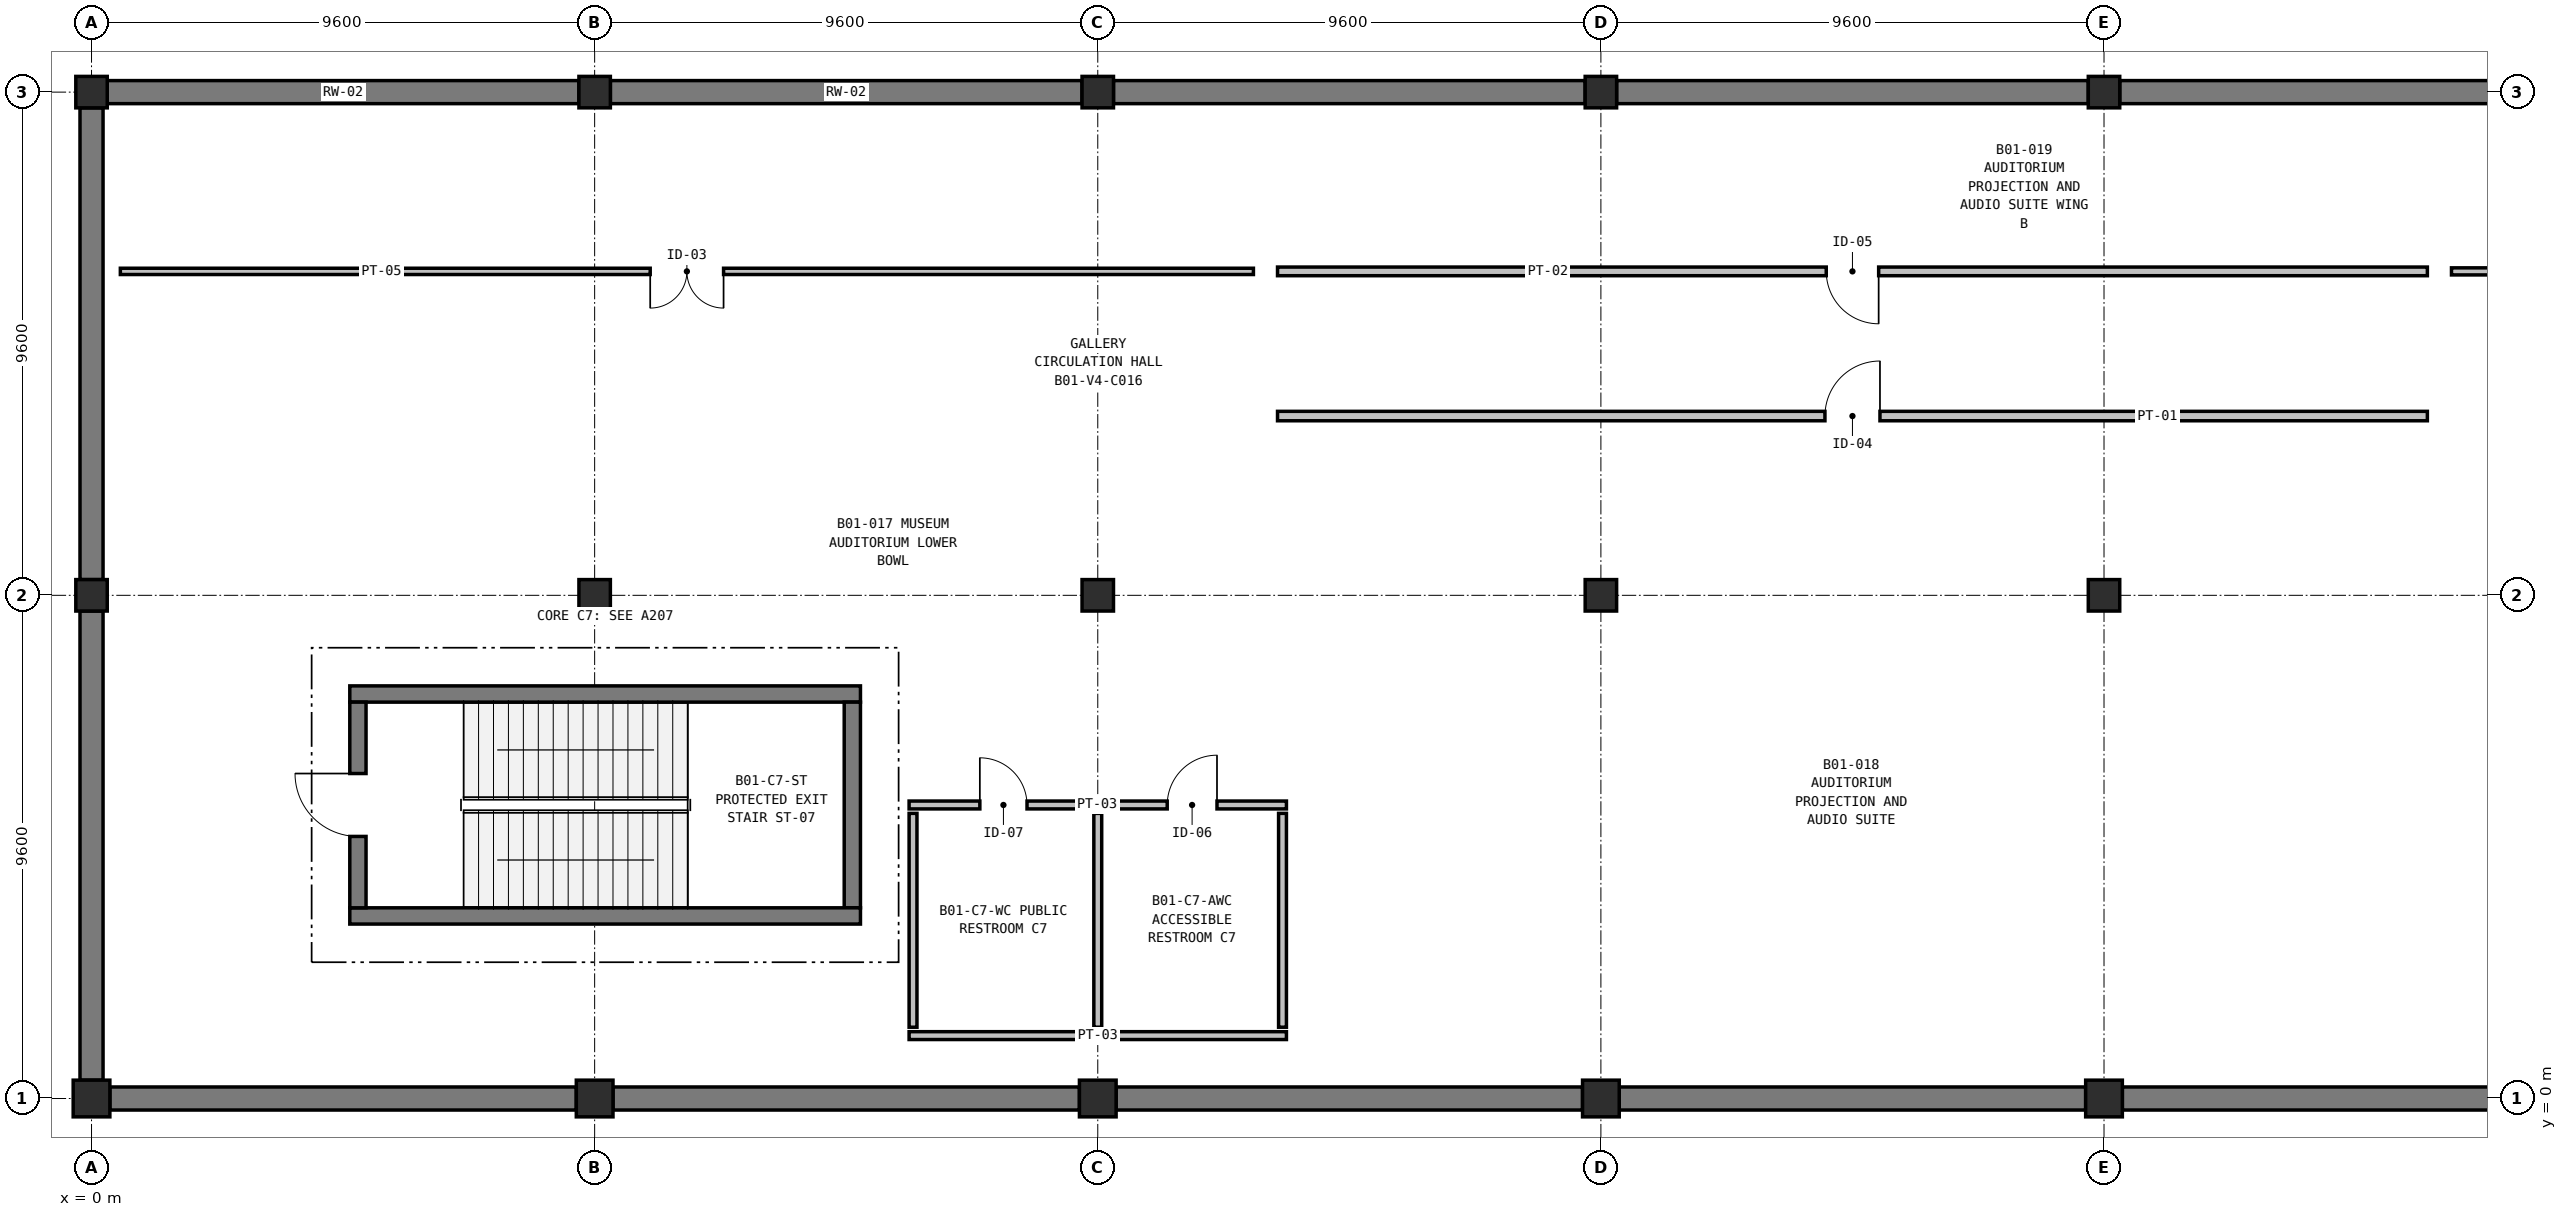
"""IFC4 building model, lengths in metres.
Left out: names, types, materials, properties, quantities, classifications, styles, units other than length and angle.
Written with IfcOpenShell. Run it as: python <this file> out.ifc"""

import sys

from ifc_helpers import new_model, si_unit, direction, frame, frame_2d, origin, origin_with_axes, origin_2d, place, context, subcontext, project, spatial, rectangle, extrude, element, fill, save


model = new_model("IFC4")
c1 = context("Model", 3, precision=1e-05, world=origin(), true_north=direction((0.0, 1.0)))
c2 = subcontext(c1, "Body", "Model", "MODEL_VIEW")
j1 = project(units=[si_unit("LENGTHUNIT", "METRE"), si_unit("PLANEANGLEUNIT", "RADIAN")], contexts=[c1])
p1 = place(None, origin())
s1 = spatial("IfcSite", under=j1, at=p1, CompositionType="ELEMENT")
p2 = place(p1, origin())
s2 = spatial("IfcBuilding", under=s1, at=p2, CompositionType="ELEMENT")
p3 = place(p2, frame((0.0, 0.0, -5.4)))
s3 = spatial("IfcBuildingStorey", under=s2, at=p3, CompositionType="ELEMENT", Elevation=-5.4)
p4 = place(p3, origin_with_axes())
e1 = element("IfcColumn", 1, at=p4, inside=s3, PredefinedType="COLUMN", context=c2, shape_type="SweptSolid", body=[
    extrude(rectangle(XDim=0.7, YDim=0.7, at=origin_2d()), origin(), (0.0, 0.0, 1.0), 5.4),
])
for number, where, z_axis, x_axis in (
    (2, (0.0, 9.6, 0.0), (0.0, 0.0, 1.0), (1.0, 0.0, 0.0)),
    (3, (0.0, 19.2, 0.0), (0.0, 0.0, 1.0), (1.0, 0.0, 0.0)),
):
    element("IfcColumn", number, at=place(p3, frame(where, z_axis=z_axis, x_axis=x_axis)), inside=s3, PredefinedType="COLUMN", context=c2, shape_type="SweptSolid", body=[
        extrude(rectangle(XDim=0.6, YDim=0.6, at=origin_2d()), origin(), (0.0, 0.0, 1.0), 5.4),
    ])
p5 = place(p3, frame((9.6, 0.0, 0.0), z_axis=(0.0, 0.0, 1.0), x_axis=(1.0, 0.0, 0.0)))
e4 = element("IfcColumn", 4, at=p5, inside=s3, PredefinedType="COLUMN", context=c2, shape_type="SweptSolid", body=[
    extrude(rectangle(XDim=0.7, YDim=0.7, at=origin_2d()), origin(), (0.0, 0.0, 1.0), 5.4),
])
for number, where, z_axis, x_axis in (
    (5, (9.6, 9.6, 0.0), (0.0, 0.0, 1.0), (1.0, 0.0, 0.0)),
    (6, (9.6, 19.2, 0.0), (0.0, 0.0, 1.0), (1.0, 0.0, 0.0)),
):
    element("IfcColumn", number, at=place(p3, frame(where, z_axis=z_axis, x_axis=x_axis)), inside=s3, PredefinedType="COLUMN", context=c2, shape_type="SweptSolid", body=[
        extrude(rectangle(XDim=0.6, YDim=0.6, at=origin_2d()), origin(), (0.0, 0.0, 1.0), 5.4),
    ])
p6 = place(p3, frame((19.2, 0.0, 0.0), z_axis=(0.0, 0.0, 1.0), x_axis=(1.0, 0.0, 0.0)))
e7 = element("IfcColumn", 7, at=p6, inside=s3, PredefinedType="COLUMN", context=c2, shape_type="SweptSolid", body=[
    extrude(rectangle(XDim=0.7, YDim=0.7, at=origin_2d()), origin(), (0.0, 0.0, 1.0), 5.4),
])
for number, where, z_axis, x_axis in (
    (8, (19.2, 9.6, 0.0), (0.0, 0.0, 1.0), (1.0, 0.0, 0.0)),
    (9, (19.2, 19.2, 0.0), (0.0, 0.0, 1.0), (1.0, 0.0, 0.0)),
):
    element("IfcColumn", number, at=place(p3, frame(where, z_axis=z_axis, x_axis=x_axis)), inside=s3, PredefinedType="COLUMN", context=c2, shape_type="SweptSolid", body=[
        extrude(rectangle(XDim=0.6, YDim=0.6, at=origin_2d()), origin(), (0.0, 0.0, 1.0), 5.4),
    ])
p7 = place(p3, frame((28.8, 0.0, 0.0), z_axis=(0.0, 0.0, 1.0), x_axis=(1.0, 0.0, 0.0)))
e10 = element("IfcColumn", 10, at=p7, inside=s3, PredefinedType="COLUMN", context=c2, shape_type="SweptSolid", body=[
    extrude(rectangle(XDim=0.7, YDim=0.7, at=origin_2d()), origin(), (0.0, 0.0, 1.0), 5.4),
])
for number, where, z_axis, x_axis in (
    (11, (28.8, 9.6, 0.0), (0.0, 0.0, 1.0), (1.0, 0.0, 0.0)),
    (12, (28.8, 19.2, 0.0), (0.0, 0.0, 1.0), (1.0, 0.0, 0.0)),
):
    element("IfcColumn", number, at=place(p3, frame(where, z_axis=z_axis, x_axis=x_axis)), inside=s3, PredefinedType="COLUMN", context=c2, shape_type="SweptSolid", body=[
        extrude(rectangle(XDim=0.6, YDim=0.6, at=origin_2d()), origin(), (0.0, 0.0, 1.0), 5.4),
    ])
p8 = place(p3, frame((38.4, 0.0, 0.0), z_axis=(0.0, 0.0, 1.0), x_axis=(1.0, 0.0, 0.0)))
e13 = element("IfcColumn", 13, at=p8, inside=s3, PredefinedType="COLUMN", context=c2, shape_type="SweptSolid", body=[
    extrude(rectangle(XDim=0.7, YDim=0.7, at=origin_2d()), origin(), (0.0, 0.0, 1.0), 5.4),
])
for number, where, z_axis, x_axis in (
    (14, (38.4, 9.6, 0.0), (0.0, 0.0, 1.0), (1.0, 0.0, 0.0)),
    (15, (38.4, 19.2, 0.0), (0.0, 0.0, 1.0), (1.0, 0.0, 0.0)),
):
    element("IfcColumn", number, at=place(p3, frame(where, z_axis=z_axis, x_axis=x_axis)), inside=s3, PredefinedType="COLUMN", context=c2, shape_type="SweptSolid", body=[
        extrude(rectangle(XDim=0.6, YDim=0.6, at=origin_2d()), origin(), (0.0, 0.0, 1.0), 5.4),
    ])
for number, where, z_axis, x_axis in (
    (16, (0.3, 19.2, 0.0), (0.0, 0.0, 1.0), (1.0, 0.0, 0.0)),
    (17, (9.9, 19.2, 0.0), (0.0, 0.0, 1.0), (1.0, 0.0, 0.0)),
    (18, (19.5, 19.2, 0.0), (0.0, 0.0, 1.0), (1.0, 0.0, 0.0)),
    (19, (29.1, 19.2, 0.0), (0.0, 0.0, 1.0), (1.0, 0.0, 0.0)),
    (20, (38.7, 19.2, 0.0), (0.0, 0.0, 1.0), (1.0, 0.0, 0.0)),
):
    element("IfcWall", number, at=place(p3, frame(where, z_axis=z_axis, x_axis=x_axis)), inside=s3, PredefinedType="USERDEFINED", context=c2, shape_type="SweptSolid", body=[
        extrude(rectangle(XDim=9.0, YDim=0.44, at=frame_2d((4.5, 0.0))), origin(), (0.0, 0.0, 1.0), 5.06),
    ])
p9 = place(p3, frame((47.65, 0.0, 0.0), z_axis=(0.0, 0.0, 1.0), x_axis=(-1.0, 0.0, 0.0)))
e21 = element("IfcWall", 21, at=p9, inside=s3, PredefinedType="USERDEFINED", context=c2, shape_type="SweptSolid", body=[
    extrude(rectangle(XDim=8.9, YDim=0.44, at=frame_2d((4.45, 0.0))), origin(), (0.0, 0.0, 1.0), 5.06),
])
p10 = place(p3, frame((38.05, 0.0, 0.0), z_axis=(0.0, 0.0, 1.0), x_axis=(-1.0, 0.0, 0.0)))
e22 = element("IfcWall", 22, at=p10, inside=s3, PredefinedType="USERDEFINED", context=c2, shape_type="SweptSolid", body=[
    extrude(rectangle(XDim=8.9, YDim=0.44, at=frame_2d((4.45, 0.0))), origin(), (0.0, 0.0, 1.0), 5.06),
])
p11 = place(p3, frame((28.45, 0.0, 0.0), z_axis=(0.0, 0.0, 1.0), x_axis=(-1.0, 0.0, 0.0)))
e23 = element("IfcWall", 23, at=p11, inside=s3, PredefinedType="USERDEFINED", context=c2, shape_type="SweptSolid", body=[
    extrude(rectangle(XDim=8.9, YDim=0.44, at=frame_2d((4.45, 0.0))), origin(), (0.0, 0.0, 1.0), 5.06),
])
p12 = place(p3, frame((18.85, 0.0, 0.0), z_axis=(0.0, 0.0, 1.0), x_axis=(-1.0, 0.0, 0.0)))
e24 = element("IfcWall", 24, at=p12, inside=s3, PredefinedType="USERDEFINED", context=c2, shape_type="SweptSolid", body=[
    extrude(rectangle(XDim=8.9, YDim=0.44, at=frame_2d((4.45, 0.0))), origin(), (0.0, 0.0, 1.0), 5.06),
])
p13 = place(p3, frame((9.25, 0.0, 0.0), z_axis=(0.0, 0.0, 1.0), x_axis=(-1.0, 0.0, 0.0)))
e25 = element("IfcWall", 25, at=p13, inside=s3, PredefinedType="USERDEFINED", context=c2, shape_type="SweptSolid", body=[
    extrude(rectangle(XDim=8.9, YDim=0.44, at=frame_2d((4.45, 0.0))), origin(), (0.0, 0.0, 1.0), 5.06),
])
p14 = place(p3, frame((0.0, 0.35, 0.0), z_axis=(0.0, 0.0, 1.0), x_axis=(0.0, 1.0, 0.0)))
e26 = element("IfcWall", 26, at=p14, inside=s3, PredefinedType="USERDEFINED", context=c2, shape_type="SweptSolid", body=[
    extrude(rectangle(XDim=8.95, YDim=0.44, at=frame_2d((4.475, 0.0))), origin(), (0.0, 0.0, 1.0), 5.06),
])
p15 = place(p3, frame((0.0, 9.9, 0.0), z_axis=(0.0, 0.0, 1.0), x_axis=(0.0, 1.0, 0.0)))
e27 = element("IfcWall", 27, at=p15, inside=s3, PredefinedType="USERDEFINED", context=c2, shape_type="SweptSolid", body=[
    extrude(rectangle(XDim=9.0, YDim=0.44, at=frame_2d((4.5, 0.0))), origin(), (0.0, 0.0, 1.0), 5.06),
])
p16 = place(p3, frame((4.928, 7.717, 0.0), z_axis=(0.0, 0.0, 1.0), x_axis=(1.0, 0.0, 0.0)))
e28 = element("IfcWall", 28, at=p16, inside=s3, PredefinedType="SHEAR", context=c2, shape_type="SweptSolid", body=[
    extrude(rectangle(XDim=9.744, YDim=0.31, at=frame_2d((4.872, 0.0))), origin(), (0.0, 0.0, 1.0), 5.06),
])
p17 = place(p3, frame((14.517, 7.562, 0.0), z_axis=(0.0, 0.0, 1.0), x_axis=(0.0, -1.0, 0.0)))
e29 = element("IfcWall", 29, at=p17, inside=s3, PredefinedType="SHEAR", context=c2, shape_type="SweptSolid", body=[
    extrude(rectangle(XDim=3.924, YDim=0.31, at=frame_2d((1.962, 0.0))), origin(), (0.0, 0.0, 1.0), 5.06),
])
p18 = place(p3, frame((14.672, 3.483, 0.0), z_axis=(0.0, 0.0, 1.0), x_axis=(-1.0, 0.0, 0.0)))
e30 = element("IfcWall", 30, at=p18, inside=s3, PredefinedType="SHEAR", context=c2, shape_type="SweptSolid", body=[
    extrude(rectangle(XDim=9.744, YDim=0.31, at=frame_2d((4.872, 0.0))), origin(), (0.0, 0.0, 1.0), 5.06),
])
p19 = place(p3, frame((5.083, 3.638, 0.0), z_axis=(0.0, 0.0, 1.0), x_axis=(0.0, 1.0, 0.0)))
e31 = element("IfcWall", 31, at=p19, inside=s3, PredefinedType="SHEAR", context=c2, shape_type="SweptSolid", body=[
    extrude(rectangle(XDim=3.924, YDim=0.31, at=frame_2d((1.962, 0.0))), origin(), (0.0, 0.0, 1.0), 5.06),
])
p20 = place(p19, frame((1.362, 0.0, 0.0)))
e32 = element("IfcOpeningElement", 32, at=p20, cuts=e31, PredefinedType="OPENING", context=c2, shape_type="SweptSolid", body=[
    extrude(rectangle(XDim=1.2, YDim=2.2, at=frame_2d((0.6, 1.1))), frame((0.0, 0.165, 0.0), z_axis=(0.0, -1.0, 0.0), x_axis=(1.0, 0.0, 0.0)), (0.0, 0.0, 1.0), 0.33),
])
p21 = place(p3, frame((15.6, 5.6, 0.0), z_axis=(0.0, 0.0, 1.0), x_axis=(1.0, 0.0, 0.0)))
e33 = element("IfcWall", 33, at=p21, inside=s3, PredefinedType="PARTITIONING", context=c2, shape_type="SweptSolid", body=[
    extrude(rectangle(XDim=7.2, YDim=0.15, at=frame_2d((3.6, 0.0))), origin(), (0.0, 0.0, 1.0), 4.235),
])
p22 = place(p21, frame((1.35, 0.0, 0.0)))
e34 = element("IfcOpeningElement", 34, at=p22, cuts=e33, PredefinedType="OPENING", context=c2, shape_type="SweptSolid", body=[
    extrude(rectangle(XDim=0.9, YDim=2.1, at=frame_2d((0.45, 1.05))), frame((0.0, 0.085, 0.0), z_axis=(0.0, -1.0, 0.0), x_axis=(1.0, 0.0, 0.0)), (0.0, 0.0, 1.0), 0.17),
])
p23 = place(p21, frame((4.925, 0.0, 0.0)))
e35 = element("IfcOpeningElement", 35, at=p23, cuts=e33, PredefinedType="OPENING", context=c2, shape_type="SweptSolid", body=[
    extrude(rectangle(XDim=0.95, YDim=2.15, at=frame_2d((0.475, 1.075))), frame((0.0, 0.085, 0.0), z_axis=(0.0, -1.0, 0.0), x_axis=(1.0, 0.0, 0.0)), (0.0, 0.0, 1.0), 0.17),
])
p24 = place(p3, frame((15.6, 1.2, 0.0), z_axis=(0.0, 0.0, 1.0), x_axis=(1.0, 0.0, 0.0)))
e36 = element("IfcWall", 36, at=p24, inside=s3, PredefinedType="PARTITIONING", context=c2, shape_type="SweptSolid", body=[
    extrude(rectangle(XDim=7.2, YDim=0.15, at=frame_2d((3.6, 0.0))), origin(), (0.0, 0.0, 1.0), 4.235),
])
p25 = place(p3, frame((15.675, 1.36, 0.0), z_axis=(0.0, 0.0, 1.0), x_axis=(0.0, 1.0, 0.0)))
e37 = element("IfcWall", 37, at=p25, inside=s3, PredefinedType="PARTITIONING", context=c2, shape_type="SweptSolid", body=[
    extrude(rectangle(XDim=4.08, YDim=0.15, at=frame_2d((2.04, 0.0))), origin(), (0.0, 0.0, 1.0), 5.06),
])
p26 = place(p3, frame((19.2, 1.36, 0.0), z_axis=(0.0, 0.0, 1.0), x_axis=(0.0, 1.0, 0.0)))
e38 = element("IfcWall", 38, at=p26, inside=s3, PredefinedType="PARTITIONING", context=c2, shape_type="SweptSolid", body=[
    extrude(rectangle(XDim=4.08, YDim=0.15, at=frame_2d((2.04, 0.0))), origin(), (0.0, 0.0, 1.0), 4.235),
])
p27 = place(p3, frame((22.725, 1.36, 0.0), z_axis=(0.0, 0.0, 1.0), x_axis=(0.0, 1.0, 0.0)))
e39 = element("IfcWall", 39, at=p27, inside=s3, PredefinedType="PARTITIONING", context=c2, shape_type="SweptSolid", body=[
    extrude(rectangle(XDim=4.08, YDim=0.15, at=frame_2d((2.04, 0.0))), origin(), (0.0, 0.0, 1.0), 4.435),
])
p28 = place(p3, frame((22.17, 15.78, 0.0), z_axis=(0.0, 0.0, 1.0), x_axis=(-1.0, 0.0, 0.0)))
e40 = element("IfcWall", 40, at=p28, inside=s3, PredefinedType="PARTITIONING", context=c2, shape_type="SweptSolid", body=[
    extrude(rectangle(XDim=21.62, YDim=0.12, at=frame_2d((10.81, 0.0))), origin(), (0.0, 0.0, 1.0), 4.235),
])
p29 = place(p28, frame((10.11, 0.0, 0.0)))
e41 = element("IfcOpeningElement", 41, at=p29, cuts=e40, PredefinedType="OPENING", context=c2, shape_type="SweptSolid", body=[
    extrude(rectangle(XDim=1.4, YDim=2.3, at=frame_2d((0.7, 1.15))), frame((0.0, 0.07, 0.0), z_axis=(0.0, -1.0, 0.0), x_axis=(1.0, 0.0, 0.0)), (0.0, 0.0, 1.0), 0.14),
])
p30 = place(p3, frame((22.63, 13.02, 0.0), z_axis=(0.0, 0.0, 1.0), x_axis=(1.0, 0.0, 0.0)))
e42 = element("IfcWall", 42, at=p30, inside=s3, PredefinedType="PARTITIONING", context=c2, shape_type="SweptSolid", body=[
    extrude(rectangle(XDim=21.94, YDim=0.18, at=frame_2d((10.97, 0.0))), origin(), (0.0, 0.0, 1.0), 4.235),
])
p31 = place(p30, frame((10.445, 0.0, 0.0)))
e43 = element("IfcOpeningElement", 43, at=p31, cuts=e42, PredefinedType="OPENING", context=c2, shape_type="SweptSolid", body=[
    extrude(rectangle(XDim=1.05, YDim=2.2, at=frame_2d((0.525, 1.1))), frame((0.0, 0.1, 0.0), z_axis=(0.0, -1.0, 0.0), x_axis=(1.0, 0.0, 0.0)), (0.0, 0.0, 1.0), 0.2),
])
p32 = place(p3, frame((44.57, 15.78, 0.0), z_axis=(0.0, 0.0, 1.0), x_axis=(-1.0, 0.0, 0.0)))
e44 = element("IfcWall", 44, at=p32, inside=s3, PredefinedType="PARTITIONING", context=c2, shape_type="SweptSolid", body=[
    extrude(rectangle(XDim=21.94, YDim=0.165, at=frame_2d((10.97, 0.0))), origin(), (0.0, 0.0, 1.0), 4.235),
])
p33 = place(p32, frame((10.47, 0.0, 0.0)))
e45 = element("IfcOpeningElement", 45, at=p33, cuts=e44, PredefinedType="OPENING", context=c2, shape_type="SweptSolid", body=[
    extrude(rectangle(XDim=1.0, YDim=2.15, at=frame_2d((0.5, 1.075))), frame((0.0, 0.093, 0.0), z_axis=(0.0, -1.0, 0.0), x_axis=(1.0, 0.0, 0.0)), (0.0, 0.0, 1.0), 0.185),
])
p34 = place(p3, frame((66.65, 15.78, 0.0), z_axis=(0.0, 0.0, 1.0), x_axis=(-1.0, 0.0, 0.0)))
e46 = element("IfcWall", 46, at=p34, inside=s3, PredefinedType="PARTITIONING", context=c2, shape_type="SweptSolid", body=[
    extrude(rectangle(XDim=21.62, YDim=0.135, at=frame_2d((10.81, 0.0))), origin(), (0.0, 0.0, 1.0), 4.235),
])
p35 = place(p34, frame((9.61, 0.0, 0.0)))
e47 = element("IfcOpeningElement", 47, at=p35, cuts=e46, PredefinedType="OPENING", context=c2, shape_type="SweptSolid", body=[
    extrude(rectangle(XDim=2.4, YDim=2.6, at=frame_2d((1.2, 1.3))), frame((0.0, 0.077, 0.0), z_axis=(0.0, -1.0, 0.0), x_axis=(1.0, 0.0, 0.0)), (0.0, 0.0, 1.0), 0.155),
])
p36 = place(p20, origin())
e48 = element("IfcDoor", 48, at=p36, inside=s3, OperationType="SINGLE_SWING_RIGHT", PredefinedType="DOOR", context=c2, shape_type="SweptSolid", body=[
    extrude(rectangle(XDim=1.2, YDim=2.2, at=frame_2d((0.6, 1.1))), frame((0.0, 0.025, 0.0), z_axis=(0.0, -1.0, 0.0), x_axis=(1.0, 0.0, 0.0)), (0.0, 0.0, 1.0), 0.05),
])
fill(e32, e48)
p37 = place(p22, origin())
e49 = element("IfcDoor", 49, at=p37, inside=s3, OperationType="SINGLE_SWING_LEFT", PredefinedType="DOOR", context=c2, shape_type="SweptSolid", body=[
    extrude(rectangle(XDim=0.9, YDim=2.1, at=frame_2d((0.45, 1.05))), frame((0.0, 0.025, 0.0), z_axis=(0.0, -1.0, 0.0), x_axis=(1.0, 0.0, 0.0)), (0.0, 0.0, 1.0), 0.05),
])
fill(e34, e49)
p38 = place(p23, origin())
e50 = element("IfcDoor", 50, at=p38, inside=s3, OperationType="SINGLE_SWING_RIGHT", PredefinedType="DOOR", context=c2, shape_type="SweptSolid", body=[
    extrude(rectangle(XDim=0.95, YDim=2.15, at=frame_2d((0.475, 1.075))), frame((0.0, 0.025, 0.0), z_axis=(0.0, -1.0, 0.0), x_axis=(1.0, 0.0, 0.0)), (0.0, 0.0, 1.0), 0.05),
])
fill(e35, e50)
p39 = place(p29, origin())
e51 = element("IfcDoor", 51, at=p39, inside=s3, OperationType="DOUBLE_DOOR_SINGLE_SWING", PredefinedType="DOOR", context=c2, shape_type="SweptSolid", body=[
    extrude(rectangle(XDim=1.4, YDim=2.3, at=frame_2d((0.7, 1.15))), frame((0.0, 0.025, 0.0), z_axis=(0.0, -1.0, 0.0), x_axis=(1.0, 0.0, 0.0)), (0.0, 0.0, 1.0), 0.05),
])
fill(e41, e51)
p40 = place(p31, origin())
e52 = element("IfcDoor", 52, at=p40, inside=s3, OperationType="SINGLE_SWING_RIGHT", PredefinedType="DOOR", context=c2, shape_type="SweptSolid", body=[
    extrude(rectangle(XDim=1.05, YDim=2.2, at=frame_2d((0.525, 1.1))), frame((0.0, 0.025, 0.0), z_axis=(0.0, -1.0, 0.0), x_axis=(1.0, 0.0, 0.0)), (0.0, 0.0, 1.0), 0.05),
])
fill(e43, e52)
p41 = place(p33, origin())
e53 = element("IfcDoor", 53, at=p41, inside=s3, OperationType="SINGLE_SWING_LEFT", PredefinedType="DOOR", context=c2, shape_type="SweptSolid", body=[
    extrude(rectangle(XDim=1.0, YDim=2.15, at=frame_2d((0.5, 1.075))), frame((0.0, 0.025, 0.0), z_axis=(0.0, -1.0, 0.0), x_axis=(1.0, 0.0, 0.0)), (0.0, 0.0, 1.0), 0.05),
])
fill(e45, e53)
save(model, sys.argv[1])
